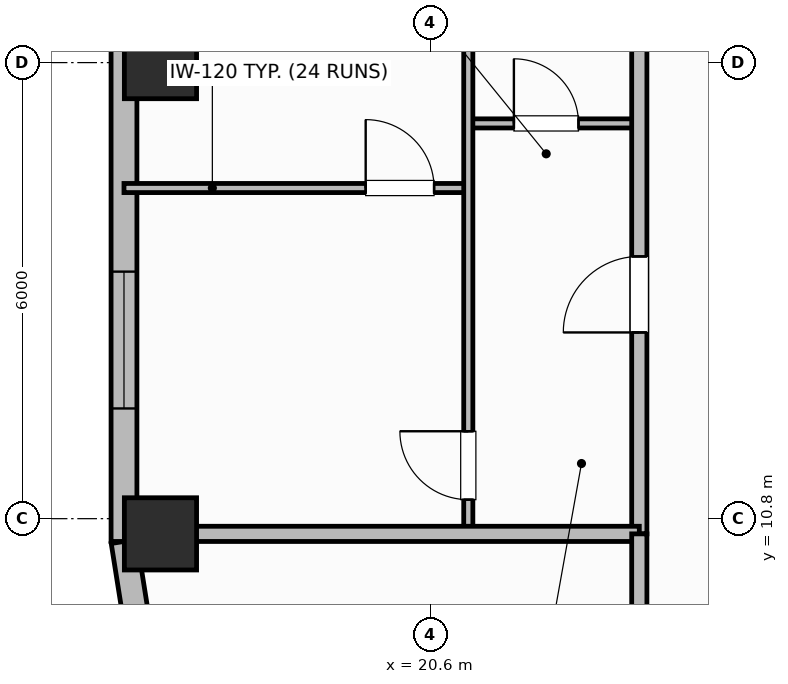
"""IFC4 building model, lengths in metres.
Left out: names, types, materials, properties, quantities, classifications, styles, units other than length and angle.
Written with IfcOpenShell. Run it as: python <this file> out.ifc"""

import sys

from ifc_helpers import new_model, si_unit, direction, frame, frame_2d, origin, origin_2d, place, context, subcontext, project, spatial, rectangle, extrude, element, fill, save


model = new_model("IFC4")
c1 = context("Model", 3, precision=1e-05, world=origin(), true_north=direction((0.0, 1.0)))
c2 = subcontext(c1, "Body", "Model", "MODEL_VIEW")
j1 = project(units=[si_unit("LENGTHUNIT", "METRE"), si_unit("PLANEANGLEUNIT", "RADIAN")], contexts=[c1])
p1 = place(None, origin())
s1 = spatial("IfcSite", under=j1, at=p1, CompositionType="ELEMENT")
p2 = place(p1, origin())
s2 = spatial("IfcBuilding", under=s1, at=p2, CompositionType="ELEMENT")
p3 = place(p2, frame((0.0, 0.0, 162.6)))
s3 = spatial("IfcBuildingStorey", under=s2, at=p3, CompositionType="ELEMENT", Elevation=162.6)
for number, where, z_axis, x_axis in (
    (1, (17.05, 10.6, 0.0), (0.0, 0.0, 1.0), (1.0, 0.0, 0.0)),
    (2, (17.05, 16.8, 0.0), (0.0, 0.0, 1.0), (1.0, 0.0, 0.0)),
):
    element("IfcColumn", number, at=place(p3, frame(where, z_axis=z_axis, x_axis=x_axis)), inside=s3, PredefinedType="COLUMN", context=c2, shape_type="SweptSolid", body=[
        extrude(rectangle(XDim=0.95, YDim=0.95, at=origin_2d()), origin(), (0.0, 0.0, 1.0), 3.7),
    ])
p4 = place(p3, frame((16.57, 10.5, 0.0), z_axis=(0.0, 0.0, 1.0), x_axis=(0.156514556949, -0.987675651954, 0.0)))
e3 = element("IfcWall", 3, at=p4, inside=s3, PredefinedType="SOLIDWALL", context=c2, shape_type="SweptSolid", body=[
    extrude(rectangle(XDim=1.135, YDim=0.34, at=frame_2d((0.568, 0.0))), origin(), (0.0, 0.0, 1.0), 2.72),
])
p5 = place(p3, frame((16.57, 23.8, 0.0), z_axis=(0.0, 0.0, 1.0), x_axis=(0.0, -1.0, 0.0)))
e4 = element("IfcWall", 4, at=p5, inside=s3, PredefinedType="SOLIDWALL", context=c2, shape_type="SweptSolid", body=[
    extrude(rectangle(XDim=13.3, YDim=0.34, at=frame_2d((6.65, 0.0))), origin(), (0.0, 0.0, 1.0), 2.72),
])
p6 = place(p5, frame((1.7, 0.0, 0.0)))
e5 = element("IfcOpeningElement", 5, at=p6, cuts=e4, PredefinedType="OPENING", context=c2, shape_type="SweptSolid", body=[
    extrude(rectangle(XDim=1.6, YDim=2.1, at=frame_2d((0.8, 1.05))), frame((0.0, 0.18, 0.0), z_axis=(0.0, -1.0, 0.0), x_axis=(1.0, 0.0, 0.0)), (0.0, 0.0, 1.0), 0.36),
])
p7 = place(p5, frame((9.75, 0.0, 0.75)))
e6 = element("IfcOpeningElement", 6, at=p7, cuts=e4, PredefinedType="OPENING", context=c2, shape_type="SweptSolid", body=[
    extrude(rectangle(XDim=1.8, YDim=1.85, at=frame_2d((0.9, 0.925))), frame((0.0, 0.18, 0.0), z_axis=(0.0, -1.0, 0.0), x_axis=(1.0, 0.0, 0.0)), (0.0, 0.0, 1.0), 0.36),
])
p8 = place(p3, frame((21.1, 16.0, 0.0), z_axis=(0.0, 0.0, 1.0), x_axis=(1.0, 0.0, 0.0)))
e7 = element("IfcWall", 7, at=p8, inside=s3, PredefinedType="PARTITIONING", context=c2, shape_type="SweptSolid", body=[
    extrude(rectangle(XDim=2.25, YDim=0.12, at=frame_2d((1.125, 0.0))), origin(), (0.0, 0.0, 1.0), 2.55),
])
p9 = place(p8, frame((0.6, 0.0, 0.0)))
e8 = element("IfcOpeningElement", 8, at=p9, cuts=e7, PredefinedType="OPENING", context=c2, shape_type="SweptSolid", body=[
    extrude(rectangle(XDim=0.85, YDim=2.1, at=frame_2d((0.425, 1.05))), frame((0.0, 0.07, 0.0), z_axis=(0.0, -1.0, 0.0), x_axis=(1.0, 0.0, 0.0)), (0.0, 0.0, 1.0), 0.14),
])
p10 = place(p3, frame((16.57, 15.15, 0.0), z_axis=(0.0, 0.0, 1.0), x_axis=(1.0, 0.0, 0.0)))
e9 = element("IfcWall", 9, at=p10, inside=s3, PredefinedType="PARTITIONING", context=c2, shape_type="SweptSolid", body=[
    extrude(rectangle(XDim=4.53, YDim=0.12, at=frame_2d((2.265, 0.0))), origin(), (0.0, 0.0, 1.0), 2.55),
])
p11 = place(p10, frame((3.18, 0.0, 0.0)))
e10 = element("IfcOpeningElement", 10, at=p11, cuts=e9, PredefinedType="OPENING", context=c2, shape_type="SweptSolid", body=[
    extrude(rectangle(XDim=0.9, YDim=2.1, at=frame_2d((0.45, 1.05))), frame((0.0, 0.07, 0.0), z_axis=(0.0, -1.0, 0.0), x_axis=(1.0, 0.0, 0.0)), (0.0, 0.0, 1.0), 0.14),
])
p12 = place(p3, frame((21.1, 10.64, 0.0), z_axis=(0.0, 0.0, 1.0), x_axis=(0.0, 1.0, 0.0)))
e11 = element("IfcWall", 11, at=p12, inside=s3, PredefinedType="PARTITIONING", context=c2, shape_type="SweptSolid", body=[
    extrude(rectangle(XDim=12.02, YDim=0.12, at=frame_2d((6.01, 0.0))), origin(), (0.0, 0.0, 1.0), 2.55),
])
p13 = place(p12, frame((0.41, 0.0, 0.0)))
e12 = element("IfcOpeningElement", 12, at=p13, cuts=e11, PredefinedType="OPENING", context=c2, shape_type="SweptSolid", body=[
    extrude(rectangle(XDim=0.9, YDim=2.1, at=frame_2d((0.45, 1.05))), frame((0.0, 0.07, 0.0), z_axis=(0.0, -1.0, 0.0), x_axis=(1.0, 0.0, 0.0)), (0.0, 0.0, 1.0), 0.14),
])
p14 = place(p12, frame((10.185, 0.0, 0.0)))
e13 = element("IfcOpeningElement", 13, at=p14, cuts=e11, PredefinedType="OPENING", context=c2, shape_type="SweptSolid", body=[
    extrude(rectangle(XDim=0.82, YDim=2.08, at=frame_2d((0.41, 1.04))), frame((0.0, 0.07, 0.0), z_axis=(0.0, -1.0, 0.0), x_axis=(1.0, 0.0, 0.0)), (0.0, 0.0, 1.0), 0.14),
])
p15 = place(p3, frame((23.35, 10.6, 0.0), z_axis=(0.0, 0.0, 1.0), x_axis=(0.0, 1.0, 0.0)))
e14 = element("IfcWall", 14, at=p15, inside=s3, PredefinedType="PARTITIONING", context=c2, shape_type="SweptSolid", body=[
    extrude(rectangle(XDim=35.2, YDim=0.2, at=frame_2d((17.6, 0.0))), origin(), (0.0, 0.0, 1.0), 2.55),
])
p16 = place(p15, frame((2.65, 0.0, 0.0)))
e15 = element("IfcOpeningElement", 15, at=p16, cuts=e14, PredefinedType="OPENING", context=c2, shape_type="SweptSolid", body=[
    extrude(rectangle(XDim=1.0, YDim=2.15, at=frame_2d((0.5, 1.075))), frame((0.0, 0.11, 0.0), z_axis=(0.0, -1.0, 0.0), x_axis=(1.0, 0.0, 0.0)), (0.0, 0.0, 1.0), 0.22),
])
p17 = place(p15, frame((12.65, 0.0, 0.0)))
e16 = element("IfcOpeningElement", 16, at=p17, cuts=e14, PredefinedType="OPENING", context=c2, shape_type="SweptSolid", body=[
    extrude(rectangle(XDim=1.0, YDim=2.15, at=frame_2d((0.5, 1.075))), frame((0.0, 0.11, 0.0), z_axis=(0.0, -1.0, 0.0), x_axis=(1.0, 0.0, 0.0)), (0.0, 0.0, 1.0), 0.22),
])
p18 = place(p15, frame((23.782, 0.0, 0.0)))
e17 = element("IfcOpeningElement", 17, at=p18, cuts=e14, PredefinedType="OPENING", context=c2, shape_type="SweptSolid", body=[
    extrude(rectangle(XDim=1.0, YDim=2.15, at=frame_2d((0.5, 1.075))), frame((0.0, 0.11, 0.0), z_axis=(0.0, -1.0, 0.0), x_axis=(1.0, 0.0, 0.0)), (0.0, 0.0, 1.0), 0.22),
])
p19 = place(p3, frame((16.99, 10.6, 0.0), z_axis=(0.0, 0.0, 1.0), x_axis=(1.0, 0.0, 0.0)))
e18 = element("IfcWall", 18, at=p19, inside=s3, PredefinedType="PARTITIONING", context=c2, shape_type="SweptSolid", body=[
    extrude(rectangle(XDim=6.36, YDim=0.2, at=frame_2d((3.18, 0.0))), origin(), (0.0, 0.0, 1.0), 2.55),
])
p20 = place(p3, frame((23.35, 6.87, 0.0), z_axis=(0.0, 0.0, 1.0), x_axis=(0.0, 1.0, 0.0)))
e19 = element("IfcWall", 19, at=p20, inside=s3, PredefinedType="PARTITIONING", context=c2, shape_type="SweptSolid", body=[
    extrude(rectangle(XDim=3.73, YDim=0.2, at=frame_2d((1.865, 0.0))), origin(), (0.0, 0.0, 1.0), 2.55),
])
p21 = place(p7, origin())
e20 = element("IfcWindow", 20, at=p21, inside=s3, PartitioningType="SINGLE_PANEL", PredefinedType="WINDOW", context=c2, shape_type="SweptSolid", body=[
    extrude(rectangle(XDim=1.8, YDim=1.85, at=frame_2d((0.9, 0.925))), frame((0.0, 0.03, 0.0), z_axis=(0.0, -1.0, 0.0), x_axis=(1.0, 0.0, 0.0)), (0.0, 0.0, 1.0), 0.06),
])
fill(e6, e20)
p22 = place(p9, origin())
e21 = element("IfcDoor", 21, at=p22, inside=s3, OperationType="SINGLE_SWING_LEFT", PredefinedType="DOOR", context=c2, shape_type="SweptSolid", body=[
    extrude(rectangle(XDim=0.85, YDim=2.1, at=frame_2d((0.425, 1.05))), frame((0.0, 0.025, 0.0), z_axis=(0.0, -1.0, 0.0), x_axis=(1.0, 0.0, 0.0)), (0.0, 0.0, 1.0), 0.05),
])
fill(e8, e21)
p23 = place(p11, origin())
e22 = element("IfcDoor", 22, at=p23, inside=s3, OperationType="SINGLE_SWING_LEFT", PredefinedType="DOOR", context=c2, shape_type="SweptSolid", body=[
    extrude(rectangle(XDim=0.9, YDim=2.1, at=frame_2d((0.45, 1.05))), frame((0.0, 0.025, 0.0), z_axis=(0.0, -1.0, 0.0), x_axis=(1.0, 0.0, 0.0)), (0.0, 0.0, 1.0), 0.05),
])
fill(e10, e22)
p24 = place(p13, origin())
e23 = element("IfcDoor", 23, at=p24, inside=s3, OperationType="SINGLE_SWING_RIGHT", PredefinedType="DOOR", context=c2, shape_type="SweptSolid", body=[
    extrude(rectangle(XDim=0.9, YDim=2.1, at=frame_2d((0.45, 1.05))), frame((0.0, 0.025, 0.0), z_axis=(0.0, -1.0, 0.0), x_axis=(1.0, 0.0, 0.0)), (0.0, 0.0, 1.0), 0.05),
])
fill(e12, e23)
p25 = place(p16, origin())
e24 = element("IfcDoor", 24, at=p25, inside=s3, OperationType="SINGLE_SWING_LEFT", PredefinedType="DOOR", context=c2, shape_type="SweptSolid", body=[
    extrude(rectangle(XDim=1.0, YDim=2.15, at=frame_2d((0.5, 1.075))), frame((0.0, 0.025, 0.0), z_axis=(0.0, -1.0, 0.0), x_axis=(1.0, 0.0, 0.0)), (0.0, 0.0, 1.0), 0.05),
])
fill(e15, e24)
save(model, sys.argv[1])
